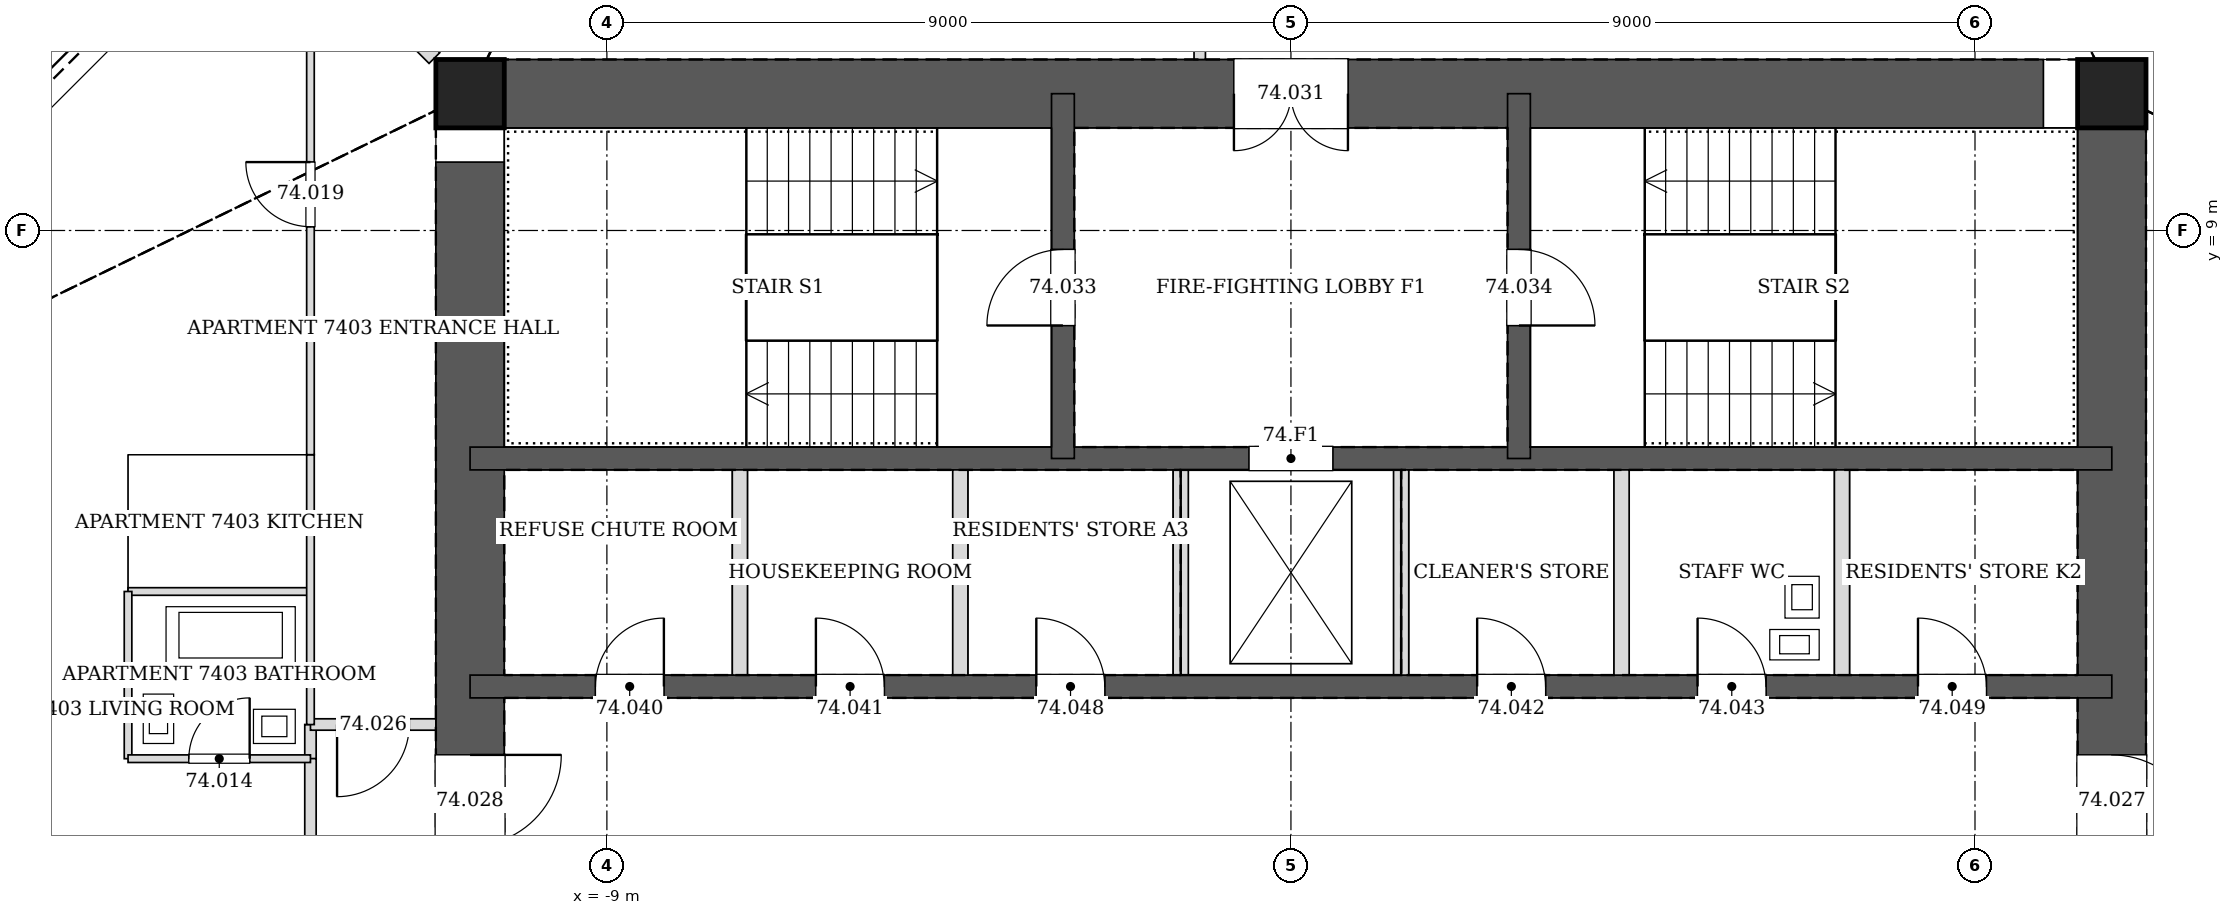
"""IFC4 building model, lengths in metres.
Left out: names, types, materials, properties, quantities, classifications, styles, units other than length and angle.
Written with IfcOpenShell. Run it as: python <this file> out.ifc"""

import sys

from ifc_helpers import new_model, si_unit, direction, frame, frame_2d, origin, origin_2d, place, context, subcontext, project, spatial, rectangle, hollow_rectangle, extrude, element, fill, save


model = new_model("IFC4")
c1 = context("Model", 3, precision=1e-05, world=origin(), true_north=direction((0.0, 1.0)))
c2 = subcontext(c1, "Body", "Model", "MODEL_VIEW")
j1 = project(units=[si_unit("LENGTHUNIT", "METRE"), si_unit("PLANEANGLEUNIT", "RADIAN")], contexts=[c1])
p1 = place(None, origin())
s1 = spatial("IfcSite", under=j1, at=p1, CompositionType="ELEMENT")
p2 = place(p1, origin())
s2 = spatial("IfcBuilding", under=s1, at=p2, CompositionType="ELEMENT")
p3 = place(p2, frame((0.0, 0.0, 301.4)))
s3 = spatial("IfcBuildingStorey", under=s2, at=p3, CompositionType="ELEMENT", Elevation=301.4)
for number, where, z_axis, x_axis in (
    (1, (10.8, 10.8, 0.0), (0.0, 0.0, 1.0), (1.0, 0.0, 0.0)),
    (2, (-10.8, 10.8, 0.0), (0.0, 0.0, 1.0), (1.0, 0.0, 0.0)),
):
    element("IfcColumn", number, at=place(p3, frame(where, z_axis=z_axis, x_axis=x_axis)), inside=s3, PredefinedType="COLUMN", context=c2, shape_type="SweptSolid", body=[
        extrude(hollow_rectangle(XDim=0.9, YDim=0.9, WallThickness=0.04, at=origin_2d()), origin(), (0.0, 0.0, 1.0), 3.4),
    ])
p4 = place(p3, frame((10.8, -10.8, 0.0), z_axis=(0.0, 0.0, 1.0), x_axis=(0.0, 1.0, 0.0)))
e3 = element("IfcWall", 3, at=p4, inside=s3, PredefinedType="SOLIDWALL", context=c2, shape_type="SweptSolid", body=[
    extrude(rectangle(XDim=21.6, YDim=0.9, at=frame_2d((10.8, 0.0))), origin(), (0.0, 0.0, 1.0), 3.4),
])
p5 = place(p4, frame((11.7, 0.0, 0.0)))
e4 = element("IfcOpeningElement", 4, at=p5, cuts=e3, PredefinedType="OPENING", context=c2, shape_type="SweptSolid", body=[
    extrude(rectangle(XDim=1.2, YDim=2.1, at=frame_2d((0.6, 1.05))), frame((0.0, 0.46, 0.0), z_axis=(0.0, -1.0, 0.0), x_axis=(1.0, 0.0, 0.0)), (0.0, 0.0, 1.0), 0.92),
])
p6 = place(p4, frame((8.7, 0.0, 0.0)))
e5 = element("IfcOpeningElement", 5, at=p6, cuts=e3, PredefinedType="OPENING", context=c2, shape_type="SweptSolid", body=[
    extrude(rectangle(XDim=1.2, YDim=2.1, at=frame_2d((0.6, 1.05))), frame((0.0, 0.46, 0.0), z_axis=(0.0, -1.0, 0.0), x_axis=(1.0, 0.0, 0.0)), (0.0, 0.0, 1.0), 0.92),
])
p7 = place(p3, frame((10.8, 10.8, 0.0), z_axis=(0.0, 0.0, 1.0), x_axis=(-1.0, 0.0, 0.0)))
e6 = element("IfcWall", 6, at=p7, inside=s3, PredefinedType="SOLIDWALL", context=c2, shape_type="SweptSolid", body=[
    extrude(rectangle(XDim=21.6, YDim=0.9, at=frame_2d((10.8, 0.0))), origin(), (0.0, 0.0, 1.0), 3.4),
])
p8 = place(p7, frame((10.05, 0.0, 0.0)))
e7 = element("IfcOpeningElement", 7, at=p8, cuts=e6, PredefinedType="OPENING", context=c2, shape_type="SweptSolid", body=[
    extrude(rectangle(XDim=1.5, YDim=2.1, at=frame_2d((0.75, 1.05))), frame((0.0, 0.46, 0.0), z_axis=(0.0, -1.0, 0.0), x_axis=(1.0, 0.0, 0.0)), (0.0, 0.0, 1.0), 0.92),
])
p9 = place(p3, frame((-10.8, 10.8, 0.0), z_axis=(0.0, 0.0, 1.0), x_axis=(0.0, -1.0, 0.0)))
e8 = element("IfcWall", 8, at=p9, inside=s3, PredefinedType="SOLIDWALL", context=c2, shape_type="SweptSolid", body=[
    extrude(rectangle(XDim=21.6, YDim=0.9, at=frame_2d((10.8, 0.0))), origin(), (0.0, 0.0, 1.0), 3.4),
])
p10 = place(p9, frame((8.7, 0.0, 0.0)))
e9 = element("IfcOpeningElement", 9, at=p10, cuts=e8, PredefinedType="OPENING", context=c2, shape_type="SweptSolid", body=[
    extrude(rectangle(XDim=1.2, YDim=2.1, at=frame_2d((0.6, 1.05))), frame((0.0, 0.46, 0.0), z_axis=(0.0, -1.0, 0.0), x_axis=(1.0, 0.0, 0.0)), (0.0, 0.0, 1.0), 0.92),
])
p11 = place(p9, frame((11.7, 0.0, 0.0)))
e10 = element("IfcOpeningElement", 10, at=p11, cuts=e8, PredefinedType="OPENING", context=c2, shape_type="SweptSolid", body=[
    extrude(rectangle(XDim=1.2, YDim=2.1, at=frame_2d((0.6, 1.05))), frame((0.0, 0.46, 0.0), z_axis=(0.0, -1.0, 0.0), x_axis=(1.0, 0.0, 0.0)), (0.0, 0.0, 1.0), 0.92),
])
p12 = place(p3, frame((-10.8, 3.0, 0.0), z_axis=(0.0, 0.0, 1.0), x_axis=(1.0, 0.0, 0.0)))
e11 = element("IfcWall", 11, at=p12, inside=s3, PredefinedType="SOLIDWALL", context=c2, shape_type="SweptSolid", body=[
    extrude(rectangle(XDim=21.6, YDim=0.3, at=frame_2d((10.8, 0.0))), origin(), (0.0, 0.0, 1.0), 3.4),
])
p13 = place(p12, frame((1.65, 0.0, 0.0)))
e12 = element("IfcOpeningElement", 12, at=p13, cuts=e11, PredefinedType="OPENING", context=c2, shape_type="SweptSolid", body=[
    extrude(rectangle(XDim=0.9, YDim=2.1, at=frame_2d((0.45, 1.05))), frame((0.0, 0.16, 0.0), z_axis=(0.0, -1.0, 0.0), x_axis=(1.0, 0.0, 0.0)), (0.0, 0.0, 1.0), 0.32),
])
p14 = place(p12, frame((4.55, 0.0, 0.0)))
e13 = element("IfcOpeningElement", 13, at=p14, cuts=e11, PredefinedType="OPENING", context=c2, shape_type="SweptSolid", body=[
    extrude(rectangle(XDim=0.9, YDim=2.1, at=frame_2d((0.45, 1.05))), frame((0.0, 0.16, 0.0), z_axis=(0.0, -1.0, 0.0), x_axis=(1.0, 0.0, 0.0)), (0.0, 0.0, 1.0), 0.32),
])
p15 = place(p12, frame((13.25, 0.0, 0.0)))
e14 = element("IfcOpeningElement", 14, at=p15, cuts=e11, PredefinedType="OPENING", context=c2, shape_type="SweptSolid", body=[
    extrude(rectangle(XDim=0.9, YDim=2.1, at=frame_2d((0.45, 1.05))), frame((0.0, 0.16, 0.0), z_axis=(0.0, -1.0, 0.0), x_axis=(1.0, 0.0, 0.0)), (0.0, 0.0, 1.0), 0.32),
])
p16 = place(p12, frame((16.15, 0.0, 0.0)))
e15 = element("IfcOpeningElement", 15, at=p16, cuts=e11, PredefinedType="OPENING", context=c2, shape_type="SweptSolid", body=[
    extrude(rectangle(XDim=0.9, YDim=2.1, at=frame_2d((0.45, 1.05))), frame((0.0, 0.16, 0.0), z_axis=(0.0, -1.0, 0.0), x_axis=(1.0, 0.0, 0.0)), (0.0, 0.0, 1.0), 0.32),
])
p17 = place(p12, frame((7.45, 0.0, 0.0)))
e16 = element("IfcOpeningElement", 16, at=p17, cuts=e11, PredefinedType="OPENING", context=c2, shape_type="SweptSolid", body=[
    extrude(rectangle(XDim=0.9, YDim=2.1, at=frame_2d((0.45, 1.05))), frame((0.0, 0.16, 0.0), z_axis=(0.0, -1.0, 0.0), x_axis=(1.0, 0.0, 0.0)), (0.0, 0.0, 1.0), 0.32),
])
p18 = place(p12, frame((19.05, 0.0, 0.0)))
e17 = element("IfcOpeningElement", 17, at=p18, cuts=e11, PredefinedType="OPENING", context=c2, shape_type="SweptSolid", body=[
    extrude(rectangle(XDim=0.9, YDim=2.1, at=frame_2d((0.45, 1.05))), frame((0.0, 0.16, 0.0), z_axis=(0.0, -1.0, 0.0), x_axis=(1.0, 0.0, 0.0)), (0.0, 0.0, 1.0), 0.32),
])
p19 = place(p3, frame((-10.8, 6.0, 0.0), z_axis=(0.0, 0.0, 1.0), x_axis=(1.0, 0.0, 0.0)))
e18 = element("IfcWall", 18, at=p19, inside=s3, PredefinedType="SOLIDWALL", context=c2, shape_type="SweptSolid", body=[
    extrude(rectangle(XDim=21.6, YDim=0.3, at=frame_2d((10.8, 0.0))), origin(), (0.0, 0.0, 1.0), 3.4),
])
p20 = place(p19, frame((10.25, 0.0, 0.0)))
e19 = element("IfcOpeningElement", 19, at=p20, cuts=e18, PredefinedType="OPENING", context=c2, shape_type="SweptSolid", body=[
    extrude(rectangle(XDim=1.1, YDim=2.1, at=frame_2d((0.55, 1.05))), frame((0.0, 0.16, 0.0), z_axis=(0.0, -1.0, 0.0), x_axis=(1.0, 0.0, 0.0)), (0.0, 0.0, 1.0), 0.32),
])
p21 = place(p3, frame((-3.0, 6.0, 0.0), z_axis=(0.0, 0.0, 1.0), x_axis=(0.0, 1.0, 0.0)))
e20 = element("IfcWall", 20, at=p21, inside=s3, PredefinedType="SOLIDWALL", context=c2, shape_type="SweptSolid", body=[
    extrude(rectangle(XDim=4.8, YDim=0.3, at=frame_2d((2.4, 0.0))), origin(), (0.0, 0.0, 1.0), 3.4),
])
p22 = place(p21, frame((1.75, 0.0, 0.0)))
e21 = element("IfcOpeningElement", 21, at=p22, cuts=e20, PredefinedType="OPENING", context=c2, shape_type="SweptSolid", body=[
    extrude(rectangle(XDim=1.0, YDim=2.1, at=frame_2d((0.5, 1.05))), frame((0.0, 0.16, 0.0), z_axis=(0.0, -1.0, 0.0), x_axis=(1.0, 0.0, 0.0)), (0.0, 0.0, 1.0), 0.32),
])
p23 = place(p3, frame((3.0, 6.0, 0.0), z_axis=(0.0, 0.0, 1.0), x_axis=(0.0, 1.0, 0.0)))
e22 = element("IfcWall", 22, at=p23, inside=s3, PredefinedType="SOLIDWALL", context=c2, shape_type="SweptSolid", body=[
    extrude(rectangle(XDim=4.8, YDim=0.3, at=frame_2d((2.4, 0.0))), origin(), (0.0, 0.0, 1.0), 3.4),
])
p24 = place(p23, frame((1.75, 0.0, 0.0)))
e23 = element("IfcOpeningElement", 23, at=p24, cuts=e22, PredefinedType="OPENING", context=c2, shape_type="SweptSolid", body=[
    extrude(rectangle(XDim=1.0, YDim=2.1, at=frame_2d((0.5, 1.05))), frame((0.0, 0.16, 0.0), z_axis=(0.0, -1.0, 0.0), x_axis=(1.0, 0.0, 0.0)), (0.0, 0.0, 1.0), 0.32),
])
p25 = place(p3, frame((-1.2, 12.9, 0.0), z_axis=(0.0, 0.0, 1.0), x_axis=(0.0, -1.0, 0.0)))
e24 = element("IfcWall", 24, at=p25, inside=s3, PredefinedType="PARTITIONING", context=c2, shape_type="SweptSolid", body=[
    extrude(rectangle(XDim=1.65, YDim=0.15, at=frame_2d((0.825, 0.0))), origin(), (0.0, 0.0, 1.0), 3.2),
])
p26 = place(p3, frame((-12.9, 2.5, 0.0), z_axis=(0.0, 0.0, 1.0), x_axis=(0.0, -1.0, 0.0)))
e25 = element("IfcWall", 25, at=p26, inside=s3, PredefinedType="PARTITIONING", context=c2, shape_type="SweptSolid", body=[
    extrude(rectangle(XDim=0.451, YDim=0.15, at=frame_2d((0.226, 0.0))), origin(), (0.0, 0.0, 1.0), 3.2),
])
p27 = place(p3, frame((-12.9, 2.051, 0.0), z_axis=(0.0, 0.0, 1.0), x_axis=(0.0, -1.0, 0.0)))
e26 = element("IfcWall", 26, at=p27, inside=s3, PredefinedType="PARTITIONING", context=c2, shape_type="SweptSolid", body=[
    extrude(rectangle(XDim=9.602, YDim=0.15, at=frame_2d((4.801, 0.0))), origin(), (0.0, 0.0, 1.0), 2.349),
])
p28 = place(p3, frame((-11.25, 2.5, 0.0), z_axis=(0.0, 0.0, 1.0), x_axis=(-1.0, 0.0, 0.0)))
e27 = element("IfcWall", 27, at=p28, inside=s3, PredefinedType="PARTITIONING", context=c2, shape_type="SweptSolid", body=[
    extrude(rectangle(XDim=1.65, YDim=0.15, at=frame_2d((0.825, 0.0))), origin(), (0.0, 0.0, 1.0), 3.2),
])
p29 = place(p28, frame((0.35, 0.0, 0.0)))
e28 = element("IfcOpeningElement", 28, at=p29, cuts=e27, PredefinedType="OPENING", context=c2, shape_type="SweptSolid", body=[
    extrude(rectangle(XDim=0.95, YDim=2.1, at=frame_2d((0.475, 1.05))), frame((0.0, 0.085, 0.0), z_axis=(0.0, -1.0, 0.0), x_axis=(1.0, 0.0, 0.0)), (0.0, 0.0, 1.0), 0.17),
])
p30 = place(p3, frame((-12.901, 12.901, 0.0), z_axis=(0.0, 0.0, 1.0), x_axis=(0.707106781187, -0.707106781187, 0.0)))
e29 = element("IfcWall", 29, at=p30, inside=s3, PredefinedType="PARTITIONING", context=c2, shape_type="SweptSolid", body=[
    extrude(rectangle(XDim=2.308, YDim=0.2, at=frame_2d((1.154, 0.0))), origin(), (0.0, 0.0, 1.0), 2.591),
])
p31 = place(p3, frame((-15.3, 4.25, 0.0), z_axis=(0.0, 0.0, 1.0), x_axis=(1.0, 0.0, 0.0)))
e30 = element("IfcWall", 30, at=p31, inside=s3, PredefinedType="PARTITIONING", context=c2, shape_type="SweptSolid", body=[
    extrude(rectangle(XDim=2.4, YDim=0.1, at=frame_2d((1.2, 0.0))), origin(), (0.0, 0.0, 1.0), 2.662),
])
p32 = place(p3, frame((-12.9, 6.05, 0.0), z_axis=(0.0, 0.0, 1.0), x_axis=(0.0, -1.0, 0.0)))
e31 = element("IfcWall", 31, at=p32, inside=s3, PredefinedType="PARTITIONING", context=c2, shape_type="SweptSolid", body=[
    extrude(rectangle(XDim=3.551, YDim=0.1, at=frame_2d((1.775, 0.0))), origin(), (0.0, 0.0, 1.0), 3.2),
])
p33 = place(p3, frame((-15.3, 4.25, 0.0), z_axis=(0.0, 0.0, 1.0), x_axis=(0.0, -1.0, 0.0)))
e32 = element("IfcWall", 32, at=p33, inside=s3, PredefinedType="PARTITIONING", context=c2, shape_type="SweptSolid", body=[
    extrude(rectangle(XDim=2.2, YDim=0.1, at=frame_2d((1.1, 0.0))), origin(), (0.0, 0.0, 1.0), 3.2),
])
p34 = place(p3, frame((-15.3, 2.05, 0.0), z_axis=(0.0, 0.0, 1.0), x_axis=(1.0, 0.0, 0.0)))
e33 = element("IfcWall", 33, at=p34, inside=s3, PredefinedType="PARTITIONING", context=c2, shape_type="SweptSolid", body=[
    extrude(rectangle(XDim=2.4, YDim=0.1, at=frame_2d((1.2, 0.0))), origin(), (0.0, 0.0, 1.0), 2.662),
])
p35 = place(p34, frame((0.8, 0.0, 0.0)))
e34 = element("IfcOpeningElement", 34, at=p35, cuts=e33, PredefinedType="OPENING", context=c2, shape_type="SweptSolid", body=[
    extrude(rectangle(XDim=0.8, YDim=2.1, at=frame_2d((0.4, 1.05))), frame((0.0, 0.06, 0.0), z_axis=(0.0, -1.0, 0.0), x_axis=(1.0, 0.0, 0.0)), (0.0, 0.0, 1.0), 0.12),
])
p36 = place(p3, frame((-12.9, 6.05, 0.0), z_axis=(0.0, 0.0, 1.0), x_axis=(0.0, 1.0, 0.0)))
e35 = element("IfcWall", 35, at=p36, inside=s3, PredefinedType="PARTITIONING", context=c2, shape_type="SweptSolid", body=[
    extrude(rectangle(XDim=6.85, YDim=0.1, at=frame_2d((3.425, 0.0))), origin(), (0.0, 0.0, 1.0), 2.436),
])
p37 = place(p36, frame((3.0, 0.0, 0.0)))
e36 = element("IfcOpeningElement", 36, at=p37, cuts=e35, PredefinedType="OPENING", context=c2, shape_type="SweptSolid", body=[
    extrude(rectangle(XDim=0.85, YDim=2.1, at=frame_2d((0.425, 1.05))), frame((0.0, 0.06, 0.0), z_axis=(0.0, -1.0, 0.0), x_axis=(1.0, 0.0, 0.0)), (0.0, 0.0, 1.0), 0.12),
])
for number, where, z_axis, x_axis in (
    (37, (-7.25, 3.15, 0.0), (0.0, 0.0, 1.0), (0.0, 1.0, 0.0)),
    (38, (-4.35, 3.15, 0.0), (0.0, 0.0, 1.0), (0.0, 1.0, 0.0)),
    (39, (-1.45, 3.15, 0.0), (0.0, 0.0, 1.0), (0.0, 1.0, 0.0)),
    (40, (1.45, 3.15, 0.0), (0.0, 0.0, 1.0), (0.0, 1.0, 0.0)),
    (41, (4.35, 3.15, 0.0), (0.0, 0.0, 1.0), (0.0, 1.0, 0.0)),
    (42, (7.25, 3.15, 0.0), (0.0, 0.0, 1.0), (0.0, 1.0, 0.0)),
):
    element("IfcWall", number, at=place(p3, frame(where, z_axis=z_axis, x_axis=x_axis)), inside=s3, PredefinedType="PARTITIONING", context=c2, shape_type="SweptSolid", body=[
        extrude(rectangle(XDim=2.7, YDim=0.2, at=frame_2d((1.35, 0.0))), origin(), (0.0, 0.0, 1.0), 3.2),
    ])
p38 = place(p35, origin())
e43 = element("IfcDoor", 43, at=p38, inside=s3, OperationType="SINGLE_SWING_RIGHT", PredefinedType="DOOR", context=c2, shape_type="SweptSolid", body=[
    extrude(rectangle(XDim=0.8, YDim=2.1, at=frame_2d((0.4, 1.05))), frame((0.0, 0.025, 0.0), z_axis=(0.0, -1.0, 0.0), x_axis=(1.0, 0.0, 0.0)), (0.0, 0.0, 1.0), 0.05),
])
fill(e34, e43)
p39 = place(p37, origin())
e44 = element("IfcDoor", 44, at=p39, inside=s3, OperationType="SINGLE_SWING_RIGHT", PredefinedType="DOOR", context=c2, shape_type="SweptSolid", body=[
    extrude(rectangle(XDim=0.85, YDim=2.1, at=frame_2d((0.425, 1.05))), frame((0.0, 0.025, 0.0), z_axis=(0.0, -1.0, 0.0), x_axis=(1.0, 0.0, 0.0)), (0.0, 0.0, 1.0), 0.05),
])
fill(e36, e44)
p40 = place(p29, origin())
e45 = element("IfcDoor", 45, at=p40, inside=s3, OperationType="SINGLE_SWING_RIGHT", PredefinedType="DOOR", context=c2, shape_type="SweptSolid", body=[
    extrude(rectangle(XDim=0.95, YDim=2.1, at=frame_2d((0.475, 1.05))), frame((0.0, 0.025, 0.0), z_axis=(0.0, -1.0, 0.0), x_axis=(1.0, 0.0, 0.0)), (0.0, 0.0, 1.0), 0.05),
])
fill(e28, e45)
p41 = place(p5, frame((1.2, 0.0, 0.0), z_axis=(0.0, 0.0, 1.0), x_axis=(-1.0, 0.0, 0.0)))
e46 = element("IfcDoor", 46, at=p41, inside=s3, OperationType="SINGLE_SWING_RIGHT", PredefinedType="DOOR", context=c2, shape_type="SweptSolid", body=[
    extrude(rectangle(XDim=1.2, YDim=2.1, at=frame_2d((0.6, 1.05))), frame((0.0, 0.025, 0.0), z_axis=(0.0, -1.0, 0.0), x_axis=(1.0, 0.0, 0.0)), (0.0, 0.0, 1.0), 0.05),
])
fill(e4, e46)
p42 = place(p10, origin())
e47 = element("IfcDoor", 47, at=p42, inside=s3, OperationType="SINGLE_SWING_LEFT", PredefinedType="DOOR", context=c2, shape_type="SweptSolid", body=[
    extrude(rectangle(XDim=1.2, YDim=2.1, at=frame_2d((0.6, 1.05))), frame((0.0, 0.025, 0.0), z_axis=(0.0, -1.0, 0.0), x_axis=(1.0, 0.0, 0.0)), (0.0, 0.0, 1.0), 0.05),
])
fill(e9, e47)
p43 = place(p8, origin())
e48 = element("IfcDoor", 48, at=p43, inside=s3, OperationType="DOUBLE_DOOR_SINGLE_SWING", PredefinedType="DOOR", context=c2, shape_type="SweptSolid", body=[
    extrude(rectangle(XDim=1.5, YDim=2.1, at=frame_2d((0.75, 1.05))), frame((0.0, 0.025, 0.0), z_axis=(0.0, -1.0, 0.0), x_axis=(1.0, 0.0, 0.0)), (0.0, 0.0, 1.0), 0.05),
])
fill(e7, e48)
p44 = place(p22, origin())
e49 = element("IfcDoor", 49, at=p44, inside=s3, OperationType="SINGLE_SWING_LEFT", PredefinedType="DOOR", context=c2, shape_type="SweptSolid", body=[
    extrude(rectangle(XDim=1.0, YDim=2.1, at=frame_2d((0.5, 1.05))), frame((0.0, 0.025, 0.0), z_axis=(0.0, -1.0, 0.0), x_axis=(1.0, 0.0, 0.0)), (0.0, 0.0, 1.0), 0.05),
])
fill(e21, e49)
p45 = place(p24, frame((1.0, 0.0, 0.0), z_axis=(0.0, 0.0, 1.0), x_axis=(-1.0, 0.0, 0.0)))
e50 = element("IfcDoor", 50, at=p45, inside=s3, OperationType="SINGLE_SWING_RIGHT", PredefinedType="DOOR", context=c2, shape_type="SweptSolid", body=[
    extrude(rectangle(XDim=1.0, YDim=2.1, at=frame_2d((0.5, 1.05))), frame((0.0, 0.025, 0.0), z_axis=(0.0, -1.0, 0.0), x_axis=(1.0, 0.0, 0.0)), (0.0, 0.0, 1.0), 0.05),
])
fill(e23, e50)
p46 = place(p13, origin())
e51 = element("IfcDoor", 51, at=p46, inside=s3, OperationType="SINGLE_SWING_RIGHT", PredefinedType="DOOR", context=c2, shape_type="SweptSolid", body=[
    extrude(rectangle(XDim=0.9, YDim=2.1, at=frame_2d((0.45, 1.05))), frame((0.0, 0.025, 0.0), z_axis=(0.0, -1.0, 0.0), x_axis=(1.0, 0.0, 0.0)), (0.0, 0.0, 1.0), 0.05),
])
fill(e12, e51)
p47 = place(p14, origin())
e52 = element("IfcDoor", 52, at=p47, inside=s3, OperationType="SINGLE_SWING_LEFT", PredefinedType="DOOR", context=c2, shape_type="SweptSolid", body=[
    extrude(rectangle(XDim=0.9, YDim=2.1, at=frame_2d((0.45, 1.05))), frame((0.0, 0.025, 0.0), z_axis=(0.0, -1.0, 0.0), x_axis=(1.0, 0.0, 0.0)), (0.0, 0.0, 1.0), 0.05),
])
fill(e13, e52)
p48 = place(p15, origin())
e53 = element("IfcDoor", 53, at=p48, inside=s3, OperationType="SINGLE_SWING_LEFT", PredefinedType="DOOR", context=c2, shape_type="SweptSolid", body=[
    extrude(rectangle(XDim=0.9, YDim=2.1, at=frame_2d((0.45, 1.05))), frame((0.0, 0.025, 0.0), z_axis=(0.0, -1.0, 0.0), x_axis=(1.0, 0.0, 0.0)), (0.0, 0.0, 1.0), 0.05),
])
fill(e14, e53)
p49 = place(p16, origin())
e54 = element("IfcDoor", 54, at=p49, inside=s3, OperationType="SINGLE_SWING_LEFT", PredefinedType="DOOR", context=c2, shape_type="SweptSolid", body=[
    extrude(rectangle(XDim=0.9, YDim=2.1, at=frame_2d((0.45, 1.05))), frame((0.0, 0.025, 0.0), z_axis=(0.0, -1.0, 0.0), x_axis=(1.0, 0.0, 0.0)), (0.0, 0.0, 1.0), 0.05),
])
fill(e15, e54)
p50 = place(p17, origin())
e55 = element("IfcDoor", 55, at=p50, inside=s3, OperationType="SINGLE_SWING_LEFT", PredefinedType="DOOR", context=c2, shape_type="SweptSolid", body=[
    extrude(rectangle(XDim=0.9, YDim=2.1, at=frame_2d((0.45, 1.05))), frame((0.0, 0.025, 0.0), z_axis=(0.0, -1.0, 0.0), x_axis=(1.0, 0.0, 0.0)), (0.0, 0.0, 1.0), 0.05),
])
fill(e16, e55)
p51 = place(p18, origin())
e56 = element("IfcDoor", 56, at=p51, inside=s3, OperationType="SINGLE_SWING_LEFT", PredefinedType="DOOR", context=c2, shape_type="SweptSolid", body=[
    extrude(rectangle(XDim=0.9, YDim=2.1, at=frame_2d((0.45, 1.05))), frame((0.0, 0.025, 0.0), z_axis=(0.0, -1.0, 0.0), x_axis=(1.0, 0.0, 0.0)), (0.0, 0.0, 1.0), 0.05),
])
fill(e17, e56)
p52 = place(p20, origin())
e57 = element("IfcDoor", 57, at=p52, inside=s3, OperationType="DOUBLE_DOOR_SLIDING", PredefinedType="DOOR", context=c2, shape_type="SweptSolid", body=[
    extrude(rectangle(XDim=1.1, YDim=2.1, at=frame_2d((0.55, 1.05))), frame((0.0, 0.025, 0.0), z_axis=(0.0, -1.0, 0.0), x_axis=(1.0, 0.0, 0.0)), (0.0, 0.0, 1.0), 0.05),
])
fill(e19, e57)
save(model, sys.argv[1])
